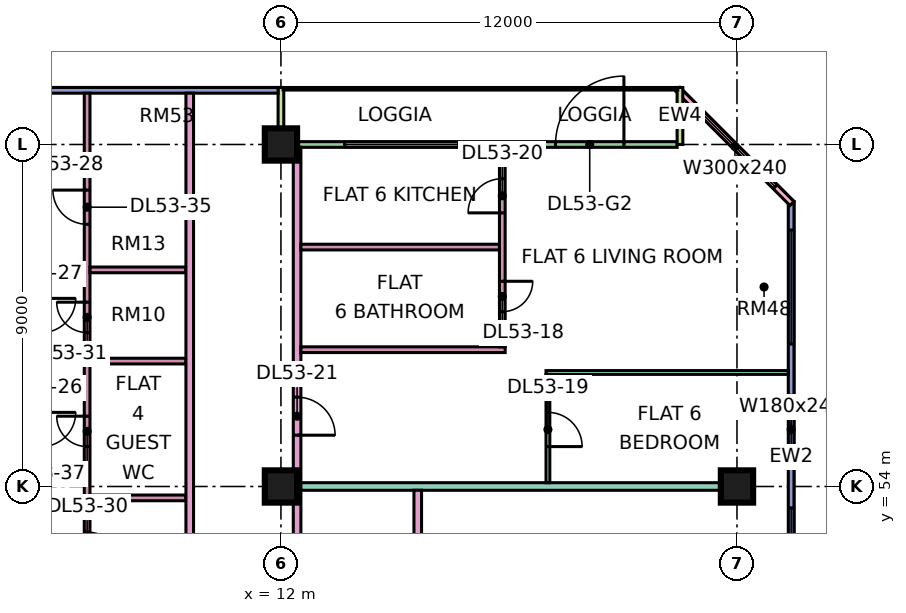
"""IFC4 building model, lengths in metres.
Left out: names, types, materials, properties, quantities, classifications, styles, units other than length and angle.
Written with IfcOpenShell. Run it as: python <this file> out.ifc"""

import sys

from ifc_helpers import new_model, si_unit, direction, frame, frame_2d, origin, origin_2d, place, context, subcontext, project, spatial, rectangle, extrude, element, fill, save


model = new_model("IFC4")
c1 = context("Model", 3, precision=1e-05, world=origin(), true_north=direction((0.0, 1.0)))
c2 = subcontext(c1, "Body", "Model", "MODEL_VIEW")
j1 = project(units=[si_unit("LENGTHUNIT", "METRE"), si_unit("PLANEANGLEUNIT", "RADIAN")], contexts=[c1])
p1 = place(None, origin())
s1 = spatial("IfcSite", under=j1, at=p1, CompositionType="ELEMENT")
p2 = place(p1, origin())
s2 = spatial("IfcBuilding", under=s1, at=p2, CompositionType="ELEMENT")
p3 = place(p2, frame((0.0, 0.0, 226.65)))
s3 = spatial("IfcBuildingStorey", under=s2, at=p3, CompositionType="ELEMENT", Elevation=226.65)
for number, where, z_axis, x_axis in (
    (1, (12.0, 54.0, 0.0), (0.0, 0.0, 1.0), (1.0, 0.0, 0.0)),
    (2, (12.0, 63.0, 0.0), (0.0, 0.0, 1.0), (1.0, 0.0, 0.0)),
    (3, (24.0, 54.0, 0.0), (0.0, 0.0, 1.0), (1.0, 0.0, 0.0)),
):
    element("IfcColumn", number, at=place(p3, frame(where, z_axis=z_axis, x_axis=x_axis)), inside=s3, PredefinedType="COLUMN", context=c2, shape_type="SweptSolid", body=[
        extrude(rectangle(XDim=0.85, YDim=0.85, at=origin_2d()), origin(), (0.0, 0.0, 1.0), 3.75),
    ])
p4 = place(p3, frame((25.425, 48.075, 0.0), z_axis=(0.0, 0.0, 1.0), x_axis=(0.0, 1.0, 0.0)))
e4 = element("IfcWall", 4, at=p4, inside=s3, PredefinedType="SOLIDWALL", context=c2, shape_type="SweptSolid", body=[
    extrude(rectangle(XDim=13.425, YDim=0.15, at=frame_2d((6.712, 0.0))), origin(), (0.0, 0.0, 1.0), 3.35),
])
p5 = place(p4, frame((0.562, 0.0, 0.45)))
e5 = element("IfcOpeningElement", 5, at=p5, cuts=e4, PredefinedType="OPENING", context=c2, shape_type="SweptSolid", body=[
    extrude(rectangle(XDim=4.8, YDim=2.4, at=frame_2d((2.4, 1.2))), frame((0.0, 0.085, 0.0), z_axis=(0.0, -1.0, 0.0), x_axis=(1.0, 0.0, 0.0)), (0.0, 0.0, 1.0), 0.17),
])
p6 = place(p4, frame((6.525, 0.0, 0.45)))
e6 = element("IfcOpeningElement", 6, at=p6, cuts=e4, PredefinedType="OPENING", context=c2, shape_type="SweptSolid", body=[
    extrude(rectangle(XDim=1.8, YDim=2.4, at=frame_2d((0.9, 1.2))), frame((0.0, 0.085, 0.0), z_axis=(0.0, -1.0, 0.0), x_axis=(1.0, 0.0, 0.0)), (0.0, 0.0, 1.0), 0.17),
])
p7 = place(p4, frame((9.675, 0.0, 0.45)))
e7 = element("IfcOpeningElement", 7, at=p7, cuts=e4, PredefinedType="OPENING", context=c2, shape_type="SweptSolid", body=[
    extrude(rectangle(XDim=3.0, YDim=2.4, at=frame_2d((1.5, 1.2))), frame((0.0, 0.085, 0.0), z_axis=(0.0, -1.0, 0.0), x_axis=(1.0, 0.0, 0.0)), (0.0, 0.0, 1.0), 0.17),
])
p8 = place(p3, frame((25.447, 61.447, 0.0), z_axis=(0.0, 0.0, 1.0), x_axis=(-0.707106781187, 0.707106781187, 0.0)))
e8 = element("IfcWall", 8, at=p8, inside=s3, PredefinedType="SOLIDWALL", context=c2, shape_type="SweptSolid", body=[
    extrude(rectangle(XDim=4.243, YDim=0.15, at=frame_2d((2.121, 0.0))), origin(), (0.0, 0.0, 1.0), 3.35),
])
p9 = place(p8, frame((0.621, 0.0, 0.45)))
e9 = element("IfcOpeningElement", 9, at=p9, cuts=e8, PredefinedType="OPENING", context=c2, shape_type="SweptSolid", body=[
    extrude(rectangle(XDim=3.0, YDim=2.4, at=frame_2d((1.5, 1.2))), frame((0.0, 0.085, 0.0), z_axis=(0.0, -1.0, 0.0), x_axis=(1.0, 0.0, 0.0)), (0.0, 0.0, 1.0), 0.17),
])
p10 = place(p3, frame((22.425, 63.0, 0.0), z_axis=(0.0, 0.0, 1.0), x_axis=(-1.0, 0.0, 0.0)))
e10 = element("IfcWall", 10, at=p10, inside=s3, PredefinedType="SOLIDWALL", context=c2, shape_type="SweptSolid", body=[
    extrude(rectangle(XDim=10.35, YDim=0.15, at=frame_2d((5.175, 0.0))), origin(), (0.0, 0.0, 1.0), 3.35),
])
p11 = place(p10, frame((1.4, 0.0, 0.0)))
e11 = element("IfcOpeningElement", 11, at=p11, cuts=e10, PredefinedType="OPENING", context=c2, shape_type="SweptSolid", body=[
    extrude(rectangle(XDim=1.8, YDim=2.4, at=frame_2d((0.9, 1.2))), frame((0.0, 0.085, 0.0), z_axis=(0.0, -1.0, 0.0), x_axis=(1.0, 0.0, 0.0)), (0.0, 0.0, 1.0), 0.17),
])
p12 = place(p10, frame((5.75, 0.0, 0.45)))
e12 = element("IfcOpeningElement", 12, at=p12, cuts=e10, PredefinedType="OPENING", context=c2, shape_type="SweptSolid", body=[
    extrude(rectangle(XDim=3.0, YDim=2.4, at=frame_2d((1.5, 1.2))), frame((0.0, 0.085, 0.0), z_axis=(0.0, -1.0, 0.0), x_axis=(1.0, 0.0, 0.0)), (0.0, 0.0, 1.0), 0.17),
])
for number, where, z_axis, x_axis in (
    (13, (22.5, 64.5, 0.0), (0.0, 0.0, 1.0), (0.0, -1.0, 0.0)),
    (14, (12.0, 64.5, 0.0), (0.0, 0.0, 1.0), (0.0, -1.0, 0.0)),
):
    element("IfcWall", number, at=place(p3, frame(where, z_axis=z_axis, x_axis=x_axis)), inside=s3, PredefinedType="SOLIDWALL", context=c2, shape_type="SweptSolid", body=[
        extrude(rectangle(XDim=1.5, YDim=0.15, at=frame_2d((0.75, 0.0))), origin(), (0.0, 0.0, 1.0), 3.35),
    ])
p13 = place(p3, frame((11.925, 64.425, 0.0), z_axis=(0.0, 0.0, 1.0), x_axis=(-1.0, 0.0, 0.0)))
e15 = element("IfcWall", 15, at=p13, inside=s3, PredefinedType="SOLIDWALL", context=c2, shape_type="SweptSolid", body=[
    extrude(rectangle(XDim=10.425, YDim=0.15, at=frame_2d((5.212, 0.0))), origin(), (0.0, 0.0, 1.0), 3.35),
])
p14 = place(p13, frame((6.675, 0.0, 0.45)))
e16 = element("IfcOpeningElement", 16, at=p14, cuts=e15, PredefinedType="OPENING", context=c2, shape_type="SweptSolid", body=[
    extrude(rectangle(XDim=3.0, YDim=2.4, at=frame_2d((1.5, 1.2))), frame((0.0, 0.085, 0.0), z_axis=(0.0, -1.0, 0.0), x_axis=(1.0, 0.0, 0.0)), (0.0, 0.0, 1.0), 0.17),
])
p15 = place(p3, frame((6.9, 39.25, 0.0), z_axis=(0.0, 0.0, 1.0), x_axis=(0.0, 1.0, 0.0)))
e17 = element("IfcWall", 17, at=p15, inside=s3, PredefinedType="PARTITIONING", context=c2, shape_type="SweptSolid", body=[
    extrude(rectangle(XDim=25.1, YDim=0.15, at=frame_2d((12.55, 0.0))), origin(), (0.0, 0.0, 1.0), 3.35),
])
p16 = place(p15, frame((9.5, 0.0, 0.0)))
e18 = element("IfcOpeningElement", 18, at=p16, cuts=e17, PredefinedType="OPENING", context=c2, shape_type="SweptSolid", body=[
    extrude(rectangle(XDim=0.8, YDim=2.1, at=frame_2d((0.4, 1.05))), frame((0.0, 0.085, 0.0), z_axis=(0.0, -1.0, 0.0), x_axis=(1.0, 0.0, 0.0)), (0.0, 0.0, 1.0), 0.17),
])
p17 = place(p15, frame((12.65, 0.0, 0.0)))
e19 = element("IfcOpeningElement", 19, at=p17, cuts=e17, PredefinedType="OPENING", context=c2, shape_type="SweptSolid", body=[
    extrude(rectangle(XDim=0.9, YDim=2.1, at=frame_2d((0.45, 1.05))), frame((0.0, 0.085, 0.0), z_axis=(0.0, -1.0, 0.0), x_axis=(1.0, 0.0, 0.0)), (0.0, 0.0, 1.0), 0.17),
])
p18 = place(p15, frame((18.8, 0.0, 0.0)))
e20 = element("IfcOpeningElement", 20, at=p18, cuts=e17, PredefinedType="OPENING", context=c2, shape_type="SweptSolid", body=[
    extrude(rectangle(XDim=0.8, YDim=2.1, at=frame_2d((0.4, 1.05))), frame((0.0, 0.085, 0.0), z_axis=(0.0, -1.0, 0.0), x_axis=(1.0, 0.0, 0.0)), (0.0, 0.0, 1.0), 0.17),
])
p19 = place(p15, frame((6.8, 0.0, 0.0)))
e21 = element("IfcOpeningElement", 21, at=p19, cuts=e17, PredefinedType="OPENING", context=c2, shape_type="SweptSolid", body=[
    extrude(rectangle(XDim=0.9, YDim=2.1, at=frame_2d((0.45, 1.05))), frame((0.0, 0.085, 0.0), z_axis=(0.0, -1.0, 0.0), x_axis=(1.0, 0.0, 0.0)), (0.0, 0.0, 1.0), 0.17),
])
p20 = place(p15, frame((21.65, 0.0, 0.0)))
e22 = element("IfcOpeningElement", 22, at=p20, cuts=e17, PredefinedType="OPENING", context=c2, shape_type="SweptSolid", body=[
    extrude(rectangle(XDim=0.9, YDim=2.1, at=frame_2d((0.45, 1.05))), frame((0.0, 0.085, 0.0), z_axis=(0.0, -1.0, 0.0), x_axis=(1.0, 0.0, 0.0)), (0.0, 0.0, 1.0), 0.17),
])
p21 = place(p15, frame((3.95, 0.0, 0.0)))
e23 = element("IfcOpeningElement", 23, at=p21, cuts=e17, PredefinedType="OPENING", context=c2, shape_type="SweptSolid", body=[
    extrude(rectangle(XDim=0.8, YDim=2.1, at=frame_2d((0.4, 1.05))), frame((0.0, 0.085, 0.0), z_axis=(0.0, -1.0, 0.0), x_axis=(1.0, 0.0, 0.0)), (0.0, 0.0, 1.0), 0.17),
])
p22 = place(p15, frame((15.8, 0.0, 0.0)))
e24 = element("IfcOpeningElement", 24, at=p22, cuts=e17, PredefinedType="OPENING", context=c2, shape_type="SweptSolid", body=[
    extrude(rectangle(XDim=0.8, YDim=2.1, at=frame_2d((0.4, 1.05))), frame((0.0, 0.085, 0.0), z_axis=(0.0, -1.0, 0.0), x_axis=(1.0, 0.0, 0.0)), (0.0, 0.0, 1.0), 0.17),
])
for number, where, z_axis, x_axis in (
    (25, (6.975, 53.7, 0.0), (0.0, 0.0, 1.0), (1.0, 0.0, 0.0)),
    (26, (6.975, 57.3, 0.0), (0.0, 0.0, 1.0), (1.0, 0.0, 0.0)),
    (27, (6.975, 59.7, 0.0), (0.0, 0.0, 1.0), (1.0, 0.0, 0.0)),
):
    element("IfcWall", number, at=place(p3, frame(where, z_axis=z_axis, x_axis=x_axis)), inside=s3, PredefinedType="PARTITIONING", context=c2, shape_type="SweptSolid", body=[
        extrude(rectangle(XDim=2.525, YDim=0.15, at=frame_2d((1.262, 0.0))), origin(), (0.0, 0.0, 1.0), 3.35),
    ])
p23 = place(p3, frame((9.6, 20.0, 0.0), z_axis=(0.0, 0.0, 1.0), x_axis=(0.0, 1.0, 0.0)))
e28 = element("IfcWall", 28, at=p23, inside=s3, PredefinedType="PARTITIONING", context=c2, shape_type="SweptSolid", body=[
    extrude(rectangle(XDim=44.35, YDim=0.2, at=frame_2d((22.175, 0.0))), origin(), (0.0, 0.0, 1.0), 3.35),
])
p24 = place(p23, frame((17.1, 0.0, 0.0)))
e29 = element("IfcOpeningElement", 29, at=p24, cuts=e28, PredefinedType="OPENING", context=c2, shape_type="SweptSolid", body=[
    extrude(rectangle(XDim=1.0, YDim=2.1, at=frame_2d((0.5, 1.05))), frame((0.0, 0.11, 0.0), z_axis=(0.0, -1.0, 0.0), x_axis=(1.0, 0.0, 0.0)), (0.0, 0.0, 1.0), 0.22),
])
p25 = place(p23, frame((0.6, 0.0, 0.0)))
e30 = element("IfcOpeningElement", 30, at=p25, cuts=e28, PredefinedType="OPENING", context=c2, shape_type="SweptSolid", body=[
    extrude(rectangle(XDim=1.2, YDim=2.1, at=frame_2d((0.6, 1.05))), frame((0.0, 0.11, 0.0), z_axis=(0.0, -1.0, 0.0), x_axis=(1.0, 0.0, 0.0)), (0.0, 0.0, 1.0), 0.22),
])
p26 = place(p23, frame((3.9, 0.0, 0.0)))
e31 = element("IfcOpeningElement", 31, at=p26, cuts=e28, PredefinedType="OPENING", context=c2, shape_type="SweptSolid", body=[
    extrude(rectangle(XDim=1.0, YDim=2.1, at=frame_2d((0.5, 1.05))), frame((0.0, 0.11, 0.0), z_axis=(0.0, -1.0, 0.0), x_axis=(1.0, 0.0, 0.0)), (0.0, 0.0, 1.0), 0.22),
])
p27 = place(p3, frame((12.425, 20.0, 0.0), z_axis=(0.0, 0.0, 1.0), x_axis=(0.0, 1.0, 0.0)))
e32 = element("IfcWall", 32, at=p27, inside=s3, PredefinedType="PARTITIONING", context=c2, shape_type="SweptSolid", body=[
    extrude(rectangle(XDim=42.926, YDim=0.2, at=frame_2d((21.463, 0.0))), origin(), (0.0, 0.0, 1.0), 3.35),
])
p28 = place(p27, frame((6.7, 0.0, 0.0)))
e33 = element("IfcOpeningElement", 33, at=p28, cuts=e32, PredefinedType="OPENING", context=c2, shape_type="SweptSolid", body=[
    extrude(rectangle(XDim=1.6, YDim=2.1, at=frame_2d((0.8, 1.05))), frame((0.0, 0.11, 0.0), z_axis=(0.0, -1.0, 0.0), x_axis=(1.0, 0.0, 0.0)), (0.0, 0.0, 1.0), 0.22),
])
p29 = place(p27, frame((12.95, 0.0, 0.0)))
e34 = element("IfcOpeningElement", 34, at=p29, cuts=e32, PredefinedType="OPENING", context=c2, shape_type="SweptSolid", body=[
    extrude(rectangle(XDim=1.0, YDim=2.1, at=frame_2d((0.5, 1.05))), frame((0.0, 0.11, 0.0), z_axis=(0.0, -1.0, 0.0), x_axis=(1.0, 0.0, 0.0)), (0.0, 0.0, 1.0), 0.22),
])
p30 = place(p27, frame((23.2, 0.0, 0.0)))
e35 = element("IfcOpeningElement", 35, at=p30, cuts=e32, PredefinedType="OPENING", context=c2, shape_type="SweptSolid", body=[
    extrude(rectangle(XDim=1.0, YDim=2.1, at=frame_2d((0.5, 1.05))), frame((0.0, 0.11, 0.0), z_axis=(0.0, -1.0, 0.0), x_axis=(1.0, 0.0, 0.0)), (0.0, 0.0, 1.0), 0.22),
])
p31 = place(p27, frame((35.35, 0.0, 0.0)))
e36 = element("IfcOpeningElement", 36, at=p31, cuts=e32, PredefinedType="OPENING", context=c2, shape_type="SweptSolid", body=[
    extrude(rectangle(XDim=1.0, YDim=2.1, at=frame_2d((0.5, 1.05))), frame((0.0, 0.11, 0.0), z_axis=(0.0, -1.0, 0.0), x_axis=(1.0, 0.0, 0.0)), (0.0, 0.0, 1.0), 0.22),
])
p32 = place(p27, frame((1.15, 0.0, 0.0)))
e37 = element("IfcOpeningElement", 37, at=p32, cuts=e32, PredefinedType="OPENING", context=c2, shape_type="SweptSolid", body=[
    extrude(rectangle(XDim=1.8, YDim=2.1, at=frame_2d((0.9, 1.05))), frame((0.0, 0.11, 0.0), z_axis=(0.0, -1.0, 0.0), x_axis=(1.0, 0.0, 0.0)), (0.0, 0.0, 1.0), 0.22),
])
p33 = place(p27, frame((28.6, 0.0, 0.0)))
e38 = element("IfcOpeningElement", 38, at=p33, cuts=e32, PredefinedType="OPENING", context=c2, shape_type="SweptSolid", body=[
    extrude(rectangle(XDim=1.8, YDim=2.1, at=frame_2d((0.9, 1.05))), frame((0.0, 0.11, 0.0), z_axis=(0.0, -1.0, 0.0), x_axis=(1.0, 0.0, 0.0)), (0.0, 0.0, 1.0), 0.22),
])
p34 = place(p3, frame((12.525, 54.0, 0.0), z_axis=(0.0, 0.0, 1.0), x_axis=(1.0, 0.0, 0.0)))
e39 = element("IfcWall", 39, at=p34, inside=s3, PredefinedType="PARTITIONING", context=c2, shape_type="SweptSolid", body=[
    extrude(rectangle(XDim=11.475, YDim=0.2, at=frame_2d((5.738, 0.0))), origin(), (0.0, 0.0, 1.0), 3.35),
])
p35 = place(p3, frame((12.525, 57.6, 0.0), z_axis=(0.0, 0.0, 1.0), x_axis=(1.0, 0.0, 0.0)))
e40 = element("IfcWall", 40, at=p35, inside=s3, PredefinedType="PARTITIONING", context=c2, shape_type="SweptSolid", body=[
    extrude(rectangle(XDim=5.375, YDim=0.15, at=frame_2d((2.688, 0.0))), origin(), (0.0, 0.0, 1.0), 3.35),
])
p36 = place(p3, frame((12.525, 60.3, 0.0), z_axis=(0.0, 0.0, 1.0), x_axis=(1.0, 0.0, 0.0)))
e41 = element("IfcWall", 41, at=p36, inside=s3, PredefinedType="PARTITIONING", context=c2, shape_type="SweptSolid", body=[
    extrude(rectangle(XDim=5.225, YDim=0.15, at=frame_2d((2.613, 0.0))), origin(), (0.0, 0.0, 1.0), 3.35),
])
p37 = place(p3, frame((15.6, 51.225, 0.0), z_axis=(0.0, 0.0, 1.0), x_axis=(0.0, 1.0, 0.0)))
e42 = element("IfcWall", 42, at=p37, inside=s3, PredefinedType="PARTITIONING", context=c2, shape_type="SweptSolid", body=[
    extrude(rectangle(XDim=2.675, YDim=0.2, at=frame_2d((1.337, 0.0))), origin(), (0.0, 0.0, 1.0), 3.35),
])
p38 = place(p3, frame((17.825, 57.675, 0.0), z_axis=(0.0, 0.0, 1.0), x_axis=(0.0, 1.0, 0.0)))
e43 = element("IfcWall", 43, at=p38, inside=s3, PredefinedType="PARTITIONING", context=c2, shape_type="SweptSolid", body=[
    extrude(rectangle(XDim=5.251, YDim=0.15, at=frame_2d((2.625, 0.0))), origin(), (0.0, 0.0, 1.0), 3.35),
])
p39 = place(p38, frame((0.925, 0.0, 0.0)))
e44 = element("IfcOpeningElement", 44, at=p39, cuts=e43, PredefinedType="OPENING", context=c2, shape_type="SweptSolid", body=[
    extrude(rectangle(XDim=0.8, YDim=2.1, at=frame_2d((0.4, 1.05))), frame((0.0, 0.085, 0.0), z_axis=(0.0, -1.0, 0.0), x_axis=(1.0, 0.0, 0.0)), (0.0, 0.0, 1.0), 0.17),
])
p40 = place(p38, frame((3.525, 0.0, 0.0)))
e45 = element("IfcOpeningElement", 45, at=p40, cuts=e43, PredefinedType="OPENING", context=c2, shape_type="SweptSolid", body=[
    extrude(rectangle(XDim=0.9, YDim=2.1, at=frame_2d((0.45, 1.05))), frame((0.0, 0.085, 0.0), z_axis=(0.0, -1.0, 0.0), x_axis=(1.0, 0.0, 0.0)), (0.0, 0.0, 1.0), 0.17),
])
p41 = place(p3, frame((18.975, 57.0, 0.0), z_axis=(0.0, 0.0, 1.0), x_axis=(1.0, 0.0, 0.0)))
e46 = element("IfcWall", 46, at=p41, inside=s3, PredefinedType="PARTITIONING", context=c2, shape_type="SweptSolid", body=[
    extrude(rectangle(XDim=6.375, YDim=0.1, at=frame_2d((3.188, 0.0))), origin(), (0.0, 0.0, 1.0), 3.35),
])
p42 = place(p3, frame((19.025, 54.1, 0.0), z_axis=(0.0, 0.0, 1.0), x_axis=(0.0, 1.0, 0.0)))
e47 = element("IfcWall", 47, at=p42, inside=s3, PredefinedType="PARTITIONING", context=c2, shape_type="SweptSolid", body=[
    extrude(rectangle(XDim=2.85, YDim=0.1, at=frame_2d((1.425, 0.0))), origin(), (0.0, 0.0, 1.0), 3.35),
])
p43 = place(p42, frame((0.95, 0.0, 0.0)))
e48 = element("IfcOpeningElement", 48, at=p43, cuts=e47, PredefinedType="OPENING", context=c2, shape_type="SweptSolid", body=[
    extrude(rectangle(XDim=0.9, YDim=2.1, at=frame_2d((0.45, 1.05))), frame((0.0, 0.06, 0.0), z_axis=(0.0, -1.0, 0.0), x_axis=(1.0, 0.0, 0.0)), (0.0, 0.0, 1.0), 0.12),
])
p44 = place(p5, origin())
e49 = element("IfcWindow", 49, at=p44, inside=s3, PartitioningType="SINGLE_PANEL", PredefinedType="WINDOW", context=c2, shape_type="SweptSolid", body=[
    extrude(rectangle(XDim=4.8, YDim=2.4, at=frame_2d((2.4, 1.2))), frame((0.0, 0.03, 0.0), z_axis=(0.0, -1.0, 0.0), x_axis=(1.0, 0.0, 0.0)), (0.0, 0.0, 1.0), 0.06),
])
fill(e5, e49)
p45 = place(p6, origin())
e50 = element("IfcWindow", 50, at=p45, inside=s3, PartitioningType="SINGLE_PANEL", PredefinedType="WINDOW", context=c2, shape_type="SweptSolid", body=[
    extrude(rectangle(XDim=1.8, YDim=2.4, at=frame_2d((0.9, 1.2))), frame((0.0, 0.03, 0.0), z_axis=(0.0, -1.0, 0.0), x_axis=(1.0, 0.0, 0.0)), (0.0, 0.0, 1.0), 0.06),
])
fill(e6, e50)
p46 = place(p7, origin())
e51 = element("IfcWindow", 51, at=p46, inside=s3, PartitioningType="SINGLE_PANEL", PredefinedType="WINDOW", context=c2, shape_type="SweptSolid", body=[
    extrude(rectangle(XDim=3.0, YDim=2.4, at=frame_2d((1.5, 1.2))), frame((0.0, 0.03, 0.0), z_axis=(0.0, -1.0, 0.0), x_axis=(1.0, 0.0, 0.0)), (0.0, 0.0, 1.0), 0.06),
])
fill(e7, e51)
p47 = place(p9, origin())
e52 = element("IfcWindow", 52, at=p47, inside=s3, PartitioningType="SINGLE_PANEL", PredefinedType="WINDOW", context=c2, shape_type="SweptSolid", body=[
    extrude(rectangle(XDim=3.0, YDim=2.4, at=frame_2d((1.5, 1.2))), frame((0.0, 0.03, 0.0), z_axis=(0.0, -1.0, 0.0), x_axis=(1.0, 0.0, 0.0)), (0.0, 0.0, 1.0), 0.06),
])
fill(e9, e52)
p48 = place(p11, frame((1.8, 0.0, 0.0), z_axis=(0.0, 0.0, 1.0), x_axis=(-1.0, 0.0, 0.0)))
e53 = element("IfcDoor", 53, at=p48, inside=s3, OperationType="DOUBLE_DOOR_SINGLE_SWING", PredefinedType="DOOR", context=c2, shape_type="SweptSolid", body=[
    extrude(rectangle(XDim=1.8, YDim=2.4, at=frame_2d((0.9, 1.2))), frame((0.0, 0.025, 0.0), z_axis=(0.0, -1.0, 0.0), x_axis=(1.0, 0.0, 0.0)), (0.0, 0.0, 1.0), 0.05),
])
fill(e11, e53)
p49 = place(p12, origin())
e54 = element("IfcWindow", 54, at=p49, inside=s3, PartitioningType="SINGLE_PANEL", PredefinedType="WINDOW", context=c2, shape_type="SweptSolid", body=[
    extrude(rectangle(XDim=3.0, YDim=2.4, at=frame_2d((1.5, 1.2))), frame((0.0, 0.03, 0.0), z_axis=(0.0, -1.0, 0.0), x_axis=(1.0, 0.0, 0.0)), (0.0, 0.0, 1.0), 0.06),
])
fill(e12, e54)
p50 = place(p39, origin())
e55 = element("IfcDoor", 55, at=p50, inside=s3, OperationType="SINGLE_SWING_RIGHT", PredefinedType="DOOR", context=c2, shape_type="SweptSolid", body=[
    extrude(rectangle(XDim=0.8, YDim=2.1, at=frame_2d((0.4, 1.05))), frame((0.0, 0.025, 0.0), z_axis=(0.0, -1.0, 0.0), x_axis=(1.0, 0.0, 0.0)), (0.0, 0.0, 1.0), 0.05),
])
fill(e44, e55)
p51 = place(p43, frame((0.9, 0.0, 0.0), z_axis=(0.0, 0.0, 1.0), x_axis=(-1.0, 0.0, 0.0)))
e56 = element("IfcDoor", 56, at=p51, inside=s3, OperationType="SINGLE_SWING_LEFT", PredefinedType="DOOR", context=c2, shape_type="SweptSolid", body=[
    extrude(rectangle(XDim=0.9, YDim=2.1, at=frame_2d((0.45, 1.05))), frame((0.0, 0.025, 0.0), z_axis=(0.0, -1.0, 0.0), x_axis=(1.0, 0.0, 0.0)), (0.0, 0.0, 1.0), 0.05),
])
fill(e48, e56)
p52 = place(p40, origin())
e57 = element("IfcDoor", 57, at=p52, inside=s3, OperationType="SINGLE_SWING_LEFT", PredefinedType="DOOR", context=c2, shape_type="SweptSolid", body=[
    extrude(rectangle(XDim=0.9, YDim=2.1, at=frame_2d((0.45, 1.05))), frame((0.0, 0.025, 0.0), z_axis=(0.0, -1.0, 0.0), x_axis=(1.0, 0.0, 0.0)), (0.0, 0.0, 1.0), 0.05),
])
fill(e45, e57)
p53 = place(p31, frame((1.0, 0.0, 0.0), z_axis=(0.0, 0.0, 1.0), x_axis=(-1.0, 0.0, 0.0)))
e58 = element("IfcDoor", 58, at=p53, inside=s3, OperationType="SINGLE_SWING_LEFT", PredefinedType="DOOR", context=c2, shape_type="SweptSolid", body=[
    extrude(rectangle(XDim=1.0, YDim=2.1, at=frame_2d((0.5, 1.05))), frame((0.0, 0.025, 0.0), z_axis=(0.0, -1.0, 0.0), x_axis=(1.0, 0.0, 0.0)), (0.0, 0.0, 1.0), 0.05),
])
fill(e36, e58)
p54 = place(p17, frame((0.9, 0.0, 0.0), z_axis=(0.0, 0.0, 1.0), x_axis=(-1.0, 0.0, 0.0)))
e59 = element("IfcDoor", 59, at=p54, inside=s3, OperationType="SINGLE_SWING_LEFT", PredefinedType="DOOR", context=c2, shape_type="SweptSolid", body=[
    extrude(rectangle(XDim=0.9, YDim=2.1, at=frame_2d((0.45, 1.05))), frame((0.0, 0.025, 0.0), z_axis=(0.0, -1.0, 0.0), x_axis=(1.0, 0.0, 0.0)), (0.0, 0.0, 1.0), 0.05),
])
fill(e19, e59)
p55 = place(p18, frame((0.8, 0.0, 0.0), z_axis=(0.0, 0.0, 1.0), x_axis=(-1.0, 0.0, 0.0)))
e60 = element("IfcDoor", 60, at=p55, inside=s3, OperationType="SINGLE_SWING_RIGHT", PredefinedType="DOOR", context=c2, shape_type="SweptSolid", body=[
    extrude(rectangle(XDim=0.8, YDim=2.1, at=frame_2d((0.4, 1.05))), frame((0.0, 0.025, 0.0), z_axis=(0.0, -1.0, 0.0), x_axis=(1.0, 0.0, 0.0)), (0.0, 0.0, 1.0), 0.05),
])
fill(e20, e60)
p56 = place(p20, frame((0.9, 0.0, 0.0), z_axis=(0.0, 0.0, 1.0), x_axis=(-1.0, 0.0, 0.0)))
e61 = element("IfcDoor", 61, at=p56, inside=s3, OperationType="SINGLE_SWING_RIGHT", PredefinedType="DOOR", context=c2, shape_type="SweptSolid", body=[
    extrude(rectangle(XDim=0.9, YDim=2.1, at=frame_2d((0.45, 1.05))), frame((0.0, 0.025, 0.0), z_axis=(0.0, -1.0, 0.0), x_axis=(1.0, 0.0, 0.0)), (0.0, 0.0, 1.0), 0.05),
])
fill(e22, e61)
p57 = place(p22, frame((0.8, 0.0, 0.0), z_axis=(0.0, 0.0, 1.0), x_axis=(-1.0, 0.0, 0.0)))
e62 = element("IfcDoor", 62, at=p57, inside=s3, OperationType="SINGLE_SWING_RIGHT", PredefinedType="DOOR", context=c2, shape_type="SweptSolid", body=[
    extrude(rectangle(XDim=0.8, YDim=2.1, at=frame_2d((0.4, 1.05))), frame((0.0, 0.025, 0.0), z_axis=(0.0, -1.0, 0.0), x_axis=(1.0, 0.0, 0.0)), (0.0, 0.0, 1.0), 0.05),
])
fill(e24, e62)
save(model, sys.argv[1])
